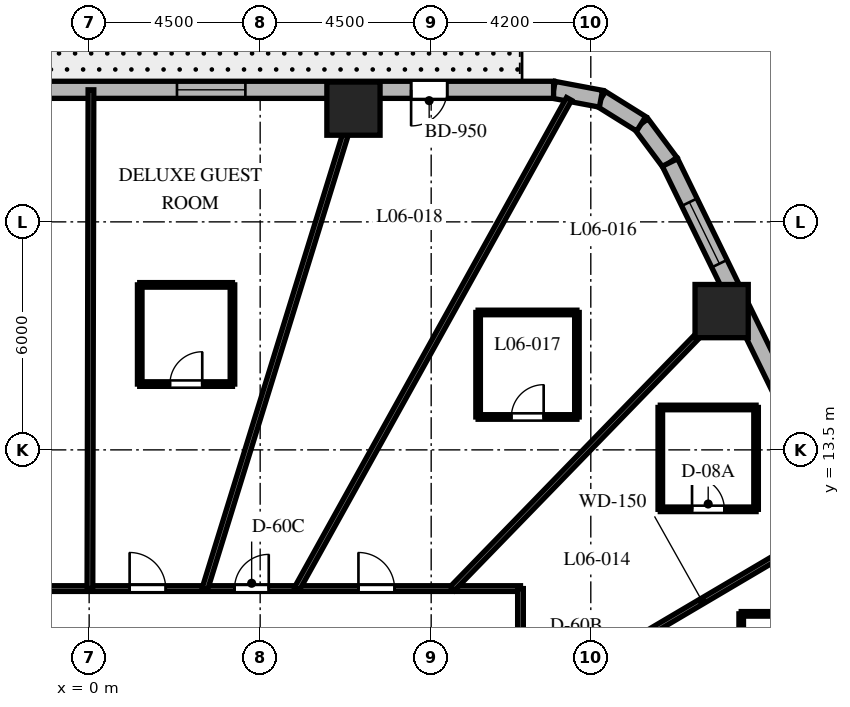
"""IFC4 building model, lengths in metres.
Left out: names, types, materials, properties, quantities, classifications, styles, units other than length and angle.
Written with IfcOpenShell. Run it as: python <this file> out.ifc"""

import sys

from ifc_helpers import new_model, si_unit, direction, frame, frame_2d, origin, origin_2d, place, context, subcontext, project, spatial, rectangle, extrude, element, fill, save


model = new_model("IFC4")
c1 = context("Model", 3, precision=1e-05, world=origin(), true_north=direction((0.0, 1.0)))
c2 = subcontext(c1, "Body", "Model", "MODEL_VIEW")
j1 = project(units=[si_unit("LENGTHUNIT", "METRE"), si_unit("PLANEANGLEUNIT", "RADIAN")], contexts=[c1])
p1 = place(None, origin())
s1 = spatial("IfcSite", under=j1, at=p1, CompositionType="ELEMENT")
p2 = place(p1, origin())
s2 = spatial("IfcBuilding", under=s1, at=p2, CompositionType="ELEMENT")
p3 = place(p2, frame((0.0, 0.0, 34.2)))
s3 = spatial("IfcBuildingStorey", under=s2, at=p3, CompositionType="ELEMENT", Elevation=34.2)
for number, where, z_axis, x_axis in (
    (1, (16.643, 17.152, 0.0), (0.0, 0.0, 1.0), (1.0, 0.0, 0.0)),
    (2, (6.955, 22.48, 0.0), (0.0, 0.0, 1.0), (1.0, 0.0, 0.0)),
):
    element("IfcColumn", number, at=place(p3, frame(where, z_axis=z_axis, x_axis=x_axis)), inside=s3, PredefinedType="COLUMN", context=c2, shape_type="SweptSolid", body=[
        extrude(rectangle(XDim=1.4, YDim=1.4, at=origin_2d()), origin(), (0.0, 0.0, 1.0), 3.7),
    ])
p4 = place(p3, frame((15.284, 21.062, 0.0), z_axis=(0.0, 0.0, 1.0), x_axis=(-0.597595366449, 0.801797841104, 0.0)))
e3 = element("IfcWall", 3, at=p4, inside=s3, PredefinedType="SOLIDWALL", context=c2, shape_type="SweptSolid", body=[
    extrude(rectangle(XDim=1.269, YDim=0.45, at=frame_2d((0.634, 0.0))), origin(), (0.0, 0.0, 1.0), 3.4),
])
p5 = place(p3, frame((14.526, 22.08, 0.0), z_axis=(0.0, 0.0, 1.0), x_axis=(-0.848185203596, 0.529699783275, 0.0)))
e4 = element("IfcWall", 4, at=p5, inside=s3, PredefinedType="SOLIDWALL", context=c2, shape_type="SweptSolid", body=[
    extrude(rectangle(XDim=1.247, YDim=0.45, at=frame_2d((0.624, 0.0))), origin(), (0.0, 0.0, 1.0), 3.4),
])
p6 = place(p3, frame((13.468, 22.74, 0.0), z_axis=(0.0, 0.0, 1.0), x_axis=(-0.982717174228, 0.185113358451, 0.0)))
e5 = element("IfcWall", 5, at=p6, inside=s3, PredefinedType="SOLIDWALL", context=c2, shape_type="SweptSolid", body=[
    extrude(rectangle(XDim=1.269, YDim=0.45, at=frame_2d((0.634, 0.0))), origin(), (0.0, 0.0, 1.0), 3.4),
])
p7 = place(p3, frame((24.336, 2.532, 0.0), z_axis=(0.0, 0.0, 1.0), x_axis=(-0.438931326393, 0.898520612291, 0.0)))
e6 = element("IfcWall", 6, at=p7, inside=s3, PredefinedType="SOLIDWALL", context=c2, shape_type="SweptSolid", body=[
    extrude(rectangle(XDim=20.623, YDim=0.45, at=frame_2d((10.312, 0.0))), origin(), (0.0, 0.0, 1.0), 3.4),
])
p8 = place(p7, frame((6.47, 0.0, 0.8)))
e7 = element("IfcOpeningElement", 7, at=p8, cuts=e6, PredefinedType="OPENING", context=c2, shape_type="SweptSolid", body=[
    extrude(rectangle(XDim=1.8, YDim=1.8, at=frame_2d((0.9, 0.9))), frame((0.0, 0.235, 0.0), z_axis=(0.0, -1.0, 0.0), x_axis=(1.0, 0.0, 0.0)), (0.0, 0.0, 1.0), 0.47),
])
p9 = place(p7, frame((12.311, 0.0, 0.8)))
e8 = element("IfcOpeningElement", 8, at=p9, cuts=e6, PredefinedType="OPENING", context=c2, shape_type="SweptSolid", body=[
    extrude(rectangle(XDim=1.8, YDim=1.8, at=frame_2d((0.9, 0.9))), frame((0.0, 0.235, 0.0), z_axis=(0.0, -1.0, 0.0), x_axis=(1.0, 0.0, 0.0)), (0.0, 0.0, 1.0), 0.47),
])
p10 = place(p7, frame((17.66, 0.0, 0.8)))
e9 = element("IfcOpeningElement", 9, at=p10, cuts=e6, PredefinedType="OPENING", context=c2, shape_type="SweptSolid", body=[
    extrude(rectangle(XDim=1.8, YDim=1.8, at=frame_2d((0.9, 0.9))), frame((0.0, 0.235, 0.0), z_axis=(0.0, -1.0, 0.0), x_axis=(1.0, 0.0, 0.0)), (0.0, 0.0, 1.0), 0.47),
])
p11 = place(p7, frame((1.214, 0.0, 0.8)))
e10 = element("IfcOpeningElement", 10, at=p11, cuts=e6, PredefinedType="OPENING", context=c2, shape_type="SweptSolid", body=[
    extrude(rectangle(XDim=1.8, YDim=1.8, at=frame_2d((0.9, 0.9))), frame((0.0, 0.235, 0.0), z_axis=(0.0, -1.0, 0.0), x_axis=(1.0, 0.0, 0.0)), (0.0, 0.0, 1.0), 0.47),
])
p12 = place(p3, frame((12.221, 22.975, 0.0), z_axis=(0.0, 0.0, 1.0), x_axis=(-1.0, 0.0, 0.0)))
e11 = element("IfcWall", 11, at=p12, inside=s3, PredefinedType="SOLIDWALL", context=c2, shape_type="SweptSolid", body=[
    extrude(rectangle(XDim=26.389, YDim=0.45, at=frame_2d((13.195, 0.0))), origin(), (0.0, 0.0, 1.0), 3.4),
])
p13 = place(p12, frame((2.799, 0.0, 0.0)))
e12 = element("IfcOpeningElement", 12, at=p13, cuts=e11, PredefinedType="OPENING", context=c2, shape_type="SweptSolid", body=[
    extrude(rectangle(XDim=0.95, YDim=2.15, at=frame_2d((0.475, 1.075))), frame((0.0, 0.235, 0.0), z_axis=(0.0, -1.0, 0.0), x_axis=(1.0, 0.0, 0.0)), (0.0, 0.0, 1.0), 0.47),
])
p14 = place(p12, frame((8.11, 0.0, 0.8)))
e13 = element("IfcOpeningElement", 13, at=p14, cuts=e11, PredefinedType="OPENING", context=c2, shape_type="SweptSolid", body=[
    extrude(rectangle(XDim=1.8, YDim=1.8, at=frame_2d((0.9, 0.9))), frame((0.0, 0.235, 0.0), z_axis=(0.0, -1.0, 0.0), x_axis=(1.0, 0.0, 0.0)), (0.0, 0.0, 1.0), 0.47),
])
p15 = place(p12, frame((15.46, 0.0, 0.8)))
e14 = element("IfcOpeningElement", 14, at=p15, cuts=e11, PredefinedType="OPENING", context=c2, shape_type="SweptSolid", body=[
    extrude(rectangle(XDim=1.8, YDim=1.8, at=frame_2d((0.9, 0.9))), frame((0.0, 0.235, 0.0), z_axis=(0.0, -1.0, 0.0), x_axis=(1.0, 0.0, 0.0)), (0.0, 0.0, 1.0), 0.47),
])
p16 = place(p12, frame((22.938, 0.0, 0.8)))
e15 = element("IfcOpeningElement", 15, at=p16, cuts=e11, PredefinedType="OPENING", context=c2, shape_type="SweptSolid", body=[
    extrude(rectangle(XDim=1.8, YDim=1.8, at=frame_2d((0.9, 0.9))), frame((0.0, 0.235, 0.0), z_axis=(0.0, -1.0, 0.0), x_axis=(1.0, 0.0, 0.0)), (0.0, 0.0, 1.0), 0.47),
])
p17 = place(p3, frame((-11.35, 9.85, 0.0), z_axis=(0.0, 0.0, 1.0), x_axis=(1.0, 0.0, 0.0)))
e16 = element("IfcWall", 16, at=p17, inside=s3, PredefinedType="PARTITIONING", context=c2, shape_type="SweptSolid", body=[
    extrude(rectangle(XDim=22.7, YDim=0.15, at=frame_2d((11.35, 0.0))), origin(), (0.0, 0.0, 1.0), 2.84),
])
p18 = place(p17, frame((18.436, 0.0, 0.0)))
e17 = element("IfcOpeningElement", 17, at=p18, cuts=e16, PredefinedType="OPENING", context=c2, shape_type="SweptSolid", body=[
    extrude(rectangle(XDim=0.95, YDim=2.03, at=frame_2d((0.475, 1.015))), frame((0.0, 0.085, 0.0), z_axis=(0.0, -1.0, 0.0), x_axis=(1.0, 0.0, 0.0)), (0.0, 0.0, 1.0), 0.17),
])
p19 = place(p17, frame((15.176, 0.0, 0.0)))
e18 = element("IfcOpeningElement", 18, at=p19, cuts=e16, PredefinedType="OPENING", context=c2, shape_type="SweptSolid", body=[
    extrude(rectangle(XDim=0.9, YDim=2.03, at=frame_2d((0.45, 1.015))), frame((0.0, 0.085, 0.0), z_axis=(0.0, -1.0, 0.0), x_axis=(1.0, 0.0, 0.0)), (0.0, 0.0, 1.0), 0.17),
])
p20 = place(p17, frame((12.415, 0.0, 0.0)))
e19 = element("IfcOpeningElement", 19, at=p20, cuts=e16, PredefinedType="OPENING", context=c2, shape_type="SweptSolid", body=[
    extrude(rectangle(XDim=0.95, YDim=2.03, at=frame_2d((0.475, 1.015))), frame((0.0, 0.085, 0.0), z_axis=(0.0, -1.0, 0.0), x_axis=(1.0, 0.0, 0.0)), (0.0, 0.0, 1.0), 0.17),
])
p21 = place(p17, frame((8.925, 0.0, 0.0)))
e20 = element("IfcOpeningElement", 20, at=p21, cuts=e16, PredefinedType="OPENING", context=c2, shape_type="SweptSolid", body=[
    extrude(rectangle(XDim=0.95, YDim=2.03, at=frame_2d((0.475, 1.015))), frame((0.0, 0.085, 0.0), z_axis=(0.0, -1.0, 0.0), x_axis=(1.0, 0.0, 0.0)), (0.0, 0.0, 1.0), 0.17),
])
p22 = place(p17, frame((3.369, 0.0, 0.0)))
e21 = element("IfcOpeningElement", 21, at=p22, cuts=e16, PredefinedType="OPENING", context=c2, shape_type="SweptSolid", body=[
    extrude(rectangle(XDim=0.95, YDim=2.03, at=frame_2d((0.475, 1.015))), frame((0.0, 0.085, 0.0), z_axis=(0.0, -1.0, 0.0), x_axis=(1.0, 0.0, 0.0)), (0.0, 0.0, 1.0), 0.17),
])
p23 = place(p3, frame((11.35, 9.85, 0.0), z_axis=(0.0, 0.0, 1.0), x_axis=(0.0, -1.0, 0.0)))
e22 = element("IfcWall", 22, at=p23, inside=s3, PredefinedType="PARTITIONING", context=c2, shape_type="SweptSolid", body=[
    extrude(rectangle(XDim=19.7, YDim=0.15, at=frame_2d((9.85, 0.0))), origin(), (0.0, 0.0, 1.0), 2.84),
])
p24 = place(p23, frame((4.461, 0.0, 0.0)))
e23 = element("IfcOpeningElement", 23, at=p24, cuts=e22, PredefinedType="OPENING", context=c2, shape_type="SweptSolid", body=[
    extrude(rectangle(XDim=0.95, YDim=2.03, at=frame_2d((0.475, 1.015))), frame((0.0, 0.085, 0.0), z_axis=(0.0, -1.0, 0.0), x_axis=(1.0, 0.0, 0.0)), (0.0, 0.0, 1.0), 0.17),
])
p25 = place(p23, frame((1.221, 0.0, 0.0)))
e24 = element("IfcOpeningElement", 24, at=p25, cuts=e22, PredefinedType="OPENING", context=c2, shape_type="SweptSolid", body=[
    extrude(rectangle(XDim=0.95, YDim=2.03, at=frame_2d((0.475, 1.015))), frame((0.0, 0.085, 0.0), z_axis=(0.0, -1.0, 0.0), x_axis=(1.0, 0.0, 0.0)), (0.0, 0.0, 1.0), 0.17),
])
p26 = place(p23, frame((16.714, 0.0, 0.0)))
e25 = element("IfcOpeningElement", 25, at=p26, cuts=e22, PredefinedType="OPENING", context=c2, shape_type="SweptSolid", body=[
    extrude(rectangle(XDim=0.95, YDim=2.03, at=frame_2d((0.475, 1.015))), frame((0.0, 0.085, 0.0), z_axis=(0.0, -1.0, 0.0), x_axis=(1.0, 0.0, 0.0)), (0.0, 0.0, 1.0), 0.17),
])
p27 = place(p23, frame((12.932, 0.0, 0.0)))
e26 = element("IfcOpeningElement", 26, at=p27, cuts=e22, PredefinedType="OPENING", context=c2, shape_type="SweptSolid", body=[
    extrude(rectangle(XDim=0.95, YDim=2.03, at=frame_2d((0.475, 1.015))), frame((0.0, 0.085, 0.0), z_axis=(0.0, -1.0, 0.0), x_axis=(1.0, 0.0, 0.0)), (0.0, 0.0, 1.0), 0.17),
])
p28 = place(p23, frame((8.838, 0.0, 0.0)))
e27 = element("IfcOpeningElement", 27, at=p28, cuts=e22, PredefinedType="OPENING", context=c2, shape_type="SweptSolid", body=[
    extrude(rectangle(XDim=0.95, YDim=2.03, at=frame_2d((0.475, 1.015))), frame((0.0, 0.085, 0.0), z_axis=(0.0, -1.0, 0.0), x_axis=(1.0, 0.0, 0.0)), (0.0, 0.0, 1.0), 0.17),
])
p29 = place(p3, frame((11.35, 6.698, 0.0), z_axis=(0.0, 0.0, 1.0), x_axis=(0.861198232886, 0.508269223614, 0.0)))
e28 = element("IfcWall", 28, at=p29, inside=s3, PredefinedType="PARTITIONING", context=c2, shape_type="SweptSolid", body=[
    extrude(rectangle(XDim=9.87, YDim=0.15, at=frame_2d((4.935, 0.0))), origin(), (0.0, 0.0, 1.0), 2.54),
])
p30 = place(p3, frame((9.558, 9.85, 0.0), z_axis=(0.0, 0.0, 1.0), x_axis=(0.69638346089, 0.717669893056, 0.0)))
e29 = element("IfcWall", 29, at=p30, inside=s3, PredefinedType="PARTITIONING", context=c2, shape_type="SweptSolid", body=[
    extrude(rectangle(XDim=10.701, YDim=0.15, at=frame_2d((5.351, 0.0))), origin(), (0.0, 0.0, 1.0), 2.54),
])
p31 = place(p3, frame((5.471, 9.85, 0.0), z_axis=(0.0, 0.0, 1.0), x_axis=(0.48553323157, 0.874218211341, 0.0)))
e30 = element("IfcWall", 30, at=p31, inside=s3, PredefinedType="PARTITIONING", context=c2, shape_type="SweptSolid", body=[
    extrude(rectangle(XDim=14.74, YDim=0.15, at=frame_2d((7.37, 0.0))), origin(), (0.0, 0.0, 1.0), 2.54),
])
p32 = place(p3, frame((3.048, 9.85, 0.0), z_axis=(0.0, 0.0, 1.0), x_axis=(0.295553992761, 0.955326037206, 0.0)))
e31 = element("IfcWall", 31, at=p32, inside=s3, PredefinedType="PARTITIONING", context=c2, shape_type="SweptSolid", body=[
    extrude(rectangle(XDim=13.739, YDim=0.15, at=frame_2d((6.869, 0.0))), origin(), (0.0, 0.0, 1.0), 2.54),
])
p33 = place(p3, frame((0.021, 9.85, 0.0), z_axis=(0.0, 0.0, 1.0), x_axis=(0.002064727742, 0.999997868447, 0.0)))
e32 = element("IfcWall", 32, at=p33, inside=s3, PredefinedType="PARTITIONING", context=c2, shape_type="SweptSolid", body=[
    extrude(rectangle(XDim=13.125, YDim=0.15, at=frame_2d((6.562, 0.0))), origin(), (0.0, 0.0, 1.0), 2.54),
])
p34 = place(p3, frame((19.598, 9.185, 0.0), z_axis=(0.0, 0.0, 1.0), x_axis=(-1.0, 0.0, 0.0)))
e33 = element("IfcWall", 33, at=p34, inside=s3, PredefinedType="PARTITIONING", context=c2, shape_type="SweptSolid", body=[
    extrude(rectangle(XDim=2.44, YDim=0.12, at=frame_2d((1.22, 0.0))), origin(), (0.0, 0.0, 1.0), 3.4),
])
p35 = place(p3, frame((17.158, 9.185, 0.0), z_axis=(0.0, 0.0, 1.0), x_axis=(0.0, -1.0, 0.0)))
e34 = element("IfcWall", 34, at=p35, inside=s3, PredefinedType="PARTITIONING", context=c2, shape_type="SweptSolid", body=[
    extrude(rectangle(XDim=2.61, YDim=0.12, at=frame_2d((1.305, 0.0))), origin(), (0.0, 0.0, 1.0), 2.84),
])
p36 = place(p3, frame((15.029, 11.936, 0.0), z_axis=(0.0, 0.0, 1.0), x_axis=(1.0, 0.0, 0.0)))
e35 = element("IfcWall", 35, at=p36, inside=s3, PredefinedType="PARTITIONING", context=c2, shape_type="SweptSolid", body=[
    extrude(rectangle(XDim=2.52, YDim=0.12, at=frame_2d((1.26, 0.0))), origin(), (0.0, 0.0, 1.0), 2.927),
])
p37 = place(p36, frame((0.835, 0.0, 0.0)))
e36 = element("IfcOpeningElement", 36, at=p37, cuts=e35, PredefinedType="OPENING", context=c2, shape_type="SweptSolid", body=[
    extrude(rectangle(XDim=0.85, YDim=2.03, at=frame_2d((0.425, 1.015))), frame((0.0, 0.07, 0.0), z_axis=(0.0, -1.0, 0.0), x_axis=(1.0, 0.0, 0.0)), (0.0, 0.0, 1.0), 0.14),
])
p38 = place(p3, frame((17.549, 11.936, 0.0), z_axis=(0.0, 0.0, 1.0), x_axis=(0.0, 1.0, 0.0)))
e37 = element("IfcWall", 37, at=p38, inside=s3, PredefinedType="PARTITIONING", context=c2, shape_type="SweptSolid", body=[
    extrude(rectangle(XDim=2.68, YDim=0.12, at=frame_2d((1.34, 0.0))), origin(), (0.0, 0.0, 1.0), 3.4),
])
p39 = place(p3, frame((17.549, 14.616, 0.0), z_axis=(0.0, 0.0, 1.0), x_axis=(-1.0, 0.0, 0.0)))
e38 = element("IfcWall", 38, at=p39, inside=s3, PredefinedType="PARTITIONING", context=c2, shape_type="SweptSolid", body=[
    extrude(rectangle(XDim=2.52, YDim=0.12, at=frame_2d((1.26, 0.0))), origin(), (0.0, 0.0, 1.0), 3.4),
])
p40 = place(p3, frame((15.029, 14.616, 0.0), z_axis=(0.0, 0.0, 1.0), x_axis=(0.0, -1.0, 0.0)))
e39 = element("IfcWall", 39, at=p40, inside=s3, PredefinedType="PARTITIONING", context=c2, shape_type="SweptSolid", body=[
    extrude(rectangle(XDim=2.68, YDim=0.12, at=frame_2d((1.34, 0.0))), origin(), (0.0, 0.0, 1.0), 2.927),
])
p41 = place(p3, frame((10.235, 14.366, 0.0), z_axis=(0.0, 0.0, 1.0), x_axis=(1.0, 0.0, 0.0)))
e40 = element("IfcWall", 40, at=p41, inside=s3, PredefinedType="PARTITIONING", context=c2, shape_type="SweptSolid", body=[
    extrude(rectangle(XDim=2.6, YDim=0.12, at=frame_2d((1.3, 0.0))), origin(), (0.0, 0.0, 1.0), 3.4),
])
p42 = place(p41, frame((0.875, 0.0, 0.0)))
e41 = element("IfcOpeningElement", 41, at=p42, cuts=e40, PredefinedType="OPENING", context=c2, shape_type="SweptSolid", body=[
    extrude(rectangle(XDim=0.85, YDim=2.03, at=frame_2d((0.425, 1.015))), frame((0.0, 0.07, 0.0), z_axis=(0.0, -1.0, 0.0), x_axis=(1.0, 0.0, 0.0)), (0.0, 0.0, 1.0), 0.14),
])
p43 = place(p3, frame((12.835, 14.366, 0.0), z_axis=(0.0, 0.0, 1.0), x_axis=(0.0, 1.0, 0.0)))
e42 = element("IfcWall", 42, at=p43, inside=s3, PredefinedType="PARTITIONING", context=c2, shape_type="SweptSolid", body=[
    extrude(rectangle(XDim=2.75, YDim=0.12, at=frame_2d((1.375, 0.0))), origin(), (0.0, 0.0, 1.0), 2.972),
])
p44 = place(p3, frame((12.835, 17.116, 0.0), z_axis=(0.0, 0.0, 1.0), x_axis=(-1.0, 0.0, 0.0)))
e43 = element("IfcWall", 43, at=p44, inside=s3, PredefinedType="PARTITIONING", context=c2, shape_type="SweptSolid", body=[
    extrude(rectangle(XDim=2.6, YDim=0.12, at=frame_2d((1.3, 0.0))), origin(), (0.0, 0.0, 1.0), 3.4),
])
p45 = place(p3, frame((10.235, 17.116, 0.0), z_axis=(0.0, 0.0, 1.0), x_axis=(0.0, -1.0, 0.0)))
e44 = element("IfcWall", 44, at=p45, inside=s3, PredefinedType="PARTITIONING", context=c2, shape_type="SweptSolid", body=[
    extrude(rectangle(XDim=2.75, YDim=0.12, at=frame_2d((1.375, 0.0))), origin(), (0.0, 0.0, 1.0), 2.972),
])
p46 = place(p3, frame((1.331, 15.232, 0.0), z_axis=(0.0, 0.0, 1.0), x_axis=(1.0, 0.0, 0.0)))
e45 = element("IfcWall", 45, at=p46, inside=s3, PredefinedType="PARTITIONING", context=c2, shape_type="SweptSolid", body=[
    extrude(rectangle(XDim=2.44, YDim=0.12, at=frame_2d((1.22, 0.0))), origin(), (0.0, 0.0, 1.0), 3.4),
])
p47 = place(p46, frame((0.795, 0.0, 0.0)))
e46 = element("IfcOpeningElement", 46, at=p47, cuts=e45, PredefinedType="OPENING", context=c2, shape_type="SweptSolid", body=[
    extrude(rectangle(XDim=0.85, YDim=2.03, at=frame_2d((0.425, 1.015))), frame((0.0, 0.07, 0.0), z_axis=(0.0, -1.0, 0.0), x_axis=(1.0, 0.0, 0.0)), (0.0, 0.0, 1.0), 0.14),
])
p48 = place(p3, frame((3.771, 15.232, 0.0), z_axis=(0.0, 0.0, 1.0), x_axis=(0.0, 1.0, 0.0)))
e47 = element("IfcWall", 47, at=p48, inside=s3, PredefinedType="PARTITIONING", context=c2, shape_type="SweptSolid", body=[
    extrude(rectangle(XDim=2.61, YDim=0.12, at=frame_2d((1.305, 0.0))), origin(), (0.0, 0.0, 1.0), 2.841),
])
p49 = place(p3, frame((3.771, 17.842, 0.0), z_axis=(0.0, 0.0, 1.0), x_axis=(-1.0, 0.0, 0.0)))
e48 = element("IfcWall", 48, at=p49, inside=s3, PredefinedType="PARTITIONING", context=c2, shape_type="SweptSolid", body=[
    extrude(rectangle(XDim=2.44, YDim=0.12, at=frame_2d((1.22, 0.0))), origin(), (0.0, 0.0, 1.0), 2.841),
])
p50 = place(p3, frame((1.331, 17.842, 0.0), z_axis=(0.0, 0.0, 1.0), x_axis=(0.0, -1.0, 0.0)))
e49 = element("IfcWall", 49, at=p50, inside=s3, PredefinedType="PARTITIONING", context=c2, shape_type="SweptSolid", body=[
    extrude(rectangle(XDim=2.61, YDim=0.12, at=frame_2d((1.305, 0.0))), origin(), (0.0, 0.0, 1.0), 2.841),
])
p51 = place(p10, origin())
e50 = element("IfcWindow", 50, at=p51, inside=s3, PartitioningType="SINGLE_PANEL", PredefinedType="WINDOW", context=c2, shape_type="SweptSolid", body=[
    extrude(rectangle(XDim=1.8, YDim=1.8, at=frame_2d((0.9, 0.9))), frame((0.0, 0.03, 0.0), z_axis=(0.0, -1.0, 0.0), x_axis=(1.0, 0.0, 0.0)), (0.0, 0.0, 1.0), 0.06),
])
fill(e9, e50)
p52 = place(p13, origin())
e51 = element("IfcDoor", 51, at=p52, inside=s3, OperationType="SINGLE_SWING_RIGHT", PredefinedType="DOOR", context=c2, shape_type="SweptSolid", body=[
    extrude(rectangle(XDim=0.95, YDim=2.15, at=frame_2d((0.475, 1.075))), frame((0.0, 0.025, 0.0), z_axis=(0.0, -1.0, 0.0), x_axis=(1.0, 0.0, 0.0)), (0.0, 0.0, 1.0), 0.05),
])
fill(e12, e51)
p53 = place(p14, origin())
e52 = element("IfcWindow", 52, at=p53, inside=s3, PartitioningType="SINGLE_PANEL", PredefinedType="WINDOW", context=c2, shape_type="SweptSolid", body=[
    extrude(rectangle(XDim=1.8, YDim=1.8, at=frame_2d((0.9, 0.9))), frame((0.0, 0.03, 0.0), z_axis=(0.0, -1.0, 0.0), x_axis=(1.0, 0.0, 0.0)), (0.0, 0.0, 1.0), 0.06),
])
fill(e13, e52)
p54 = place(p37, origin())
e53 = element("IfcDoor", 53, at=p54, inside=s3, OperationType="SINGLE_SWING_LEFT", PredefinedType="DOOR", context=c2, shape_type="SweptSolid", body=[
    extrude(rectangle(XDim=0.85, YDim=2.03, at=frame_2d((0.425, 1.015))), frame((0.0, 0.025, 0.0), z_axis=(0.0, -1.0, 0.0), x_axis=(1.0, 0.0, 0.0)), (0.0, 0.0, 1.0), 0.05),
])
fill(e36, e53)
p55 = place(p18, origin())
e54 = element("IfcDoor", 54, at=p55, inside=s3, OperationType="SINGLE_SWING_LEFT", PredefinedType="DOOR", context=c2, shape_type="SweptSolid", body=[
    extrude(rectangle(XDim=0.95, YDim=2.03, at=frame_2d((0.475, 1.015))), frame((0.0, 0.025, 0.0), z_axis=(0.0, -1.0, 0.0), x_axis=(1.0, 0.0, 0.0)), (0.0, 0.0, 1.0), 0.05),
])
fill(e17, e54)
p56 = place(p42, origin())
e55 = element("IfcDoor", 55, at=p56, inside=s3, OperationType="SINGLE_SWING_RIGHT", PredefinedType="DOOR", context=c2, shape_type="SweptSolid", body=[
    extrude(rectangle(XDim=0.85, YDim=2.03, at=frame_2d((0.425, 1.015))), frame((0.0, 0.025, 0.0), z_axis=(0.0, -1.0, 0.0), x_axis=(1.0, 0.0, 0.0)), (0.0, 0.0, 1.0), 0.05),
])
fill(e41, e55)
p57 = place(p19, origin())
e56 = element("IfcDoor", 56, at=p57, inside=s3, OperationType="SINGLE_SWING_RIGHT", PredefinedType="DOOR", context=c2, shape_type="SweptSolid", body=[
    extrude(rectangle(XDim=0.9, YDim=2.03, at=frame_2d((0.45, 1.015))), frame((0.0, 0.025, 0.0), z_axis=(0.0, -1.0, 0.0), x_axis=(1.0, 0.0, 0.0)), (0.0, 0.0, 1.0), 0.05),
])
fill(e18, e56)
p58 = place(p20, origin())
e57 = element("IfcDoor", 57, at=p58, inside=s3, OperationType="SINGLE_SWING_LEFT", PredefinedType="DOOR", context=c2, shape_type="SweptSolid", body=[
    extrude(rectangle(XDim=0.95, YDim=2.03, at=frame_2d((0.475, 1.015))), frame((0.0, 0.025, 0.0), z_axis=(0.0, -1.0, 0.0), x_axis=(1.0, 0.0, 0.0)), (0.0, 0.0, 1.0), 0.05),
])
fill(e19, e57)
p59 = place(p47, origin())
e58 = element("IfcDoor", 58, at=p59, inside=s3, OperationType="SINGLE_SWING_RIGHT", PredefinedType="DOOR", context=c2, shape_type="SweptSolid", body=[
    extrude(rectangle(XDim=0.85, YDim=2.03, at=frame_2d((0.425, 1.015))), frame((0.0, 0.025, 0.0), z_axis=(0.0, -1.0, 0.0), x_axis=(1.0, 0.0, 0.0)), (0.0, 0.0, 1.0), 0.05),
])
fill(e46, e58)
save(model, sys.argv[1])
